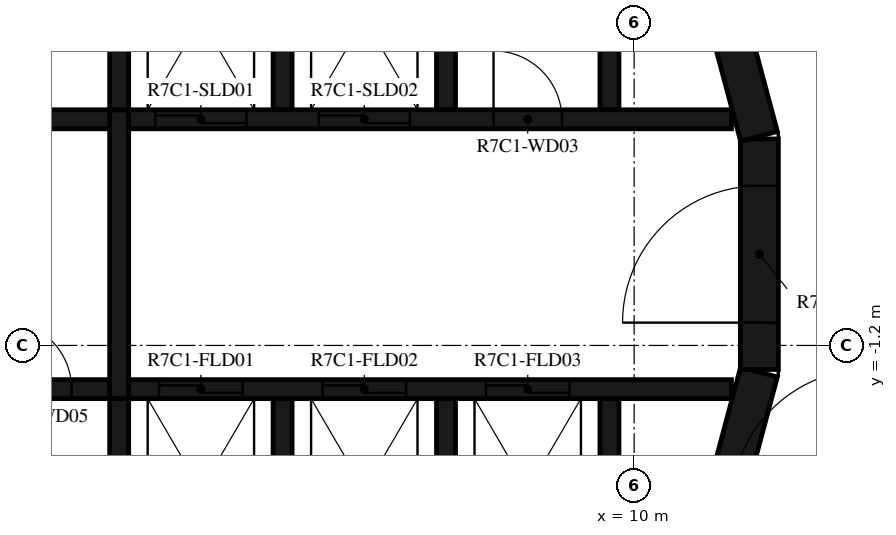
"""IFC4 building model, lengths in metres.
Left out: names, types, materials, properties, quantities, classifications, styles, units other than length and angle.
Written with IfcOpenShell. Run it as: python <this file> out.ifc"""

import sys

from ifc_helpers import new_model, si_unit, direction, frame, frame_2d, origin, place, context, subcontext, project, spatial, polyline, rectangle, outline, extrude, element, fill, save


model = new_model("IFC4")
c1 = context("Model", 3, precision=1e-05, world=origin(), true_north=direction((0.0, 1.0)))
c2 = subcontext(c1, "Body", "Model", "MODEL_VIEW")
j1 = project(units=[si_unit("LENGTHUNIT", "METRE"), si_unit("PLANEANGLEUNIT", "RADIAN")], contexts=[c1])
p1 = place(None, origin())
s1 = spatial("IfcSite", under=j1, at=p1, CompositionType="ELEMENT")
p2 = place(p1, origin())
s2 = spatial("IfcBuilding", under=s1, at=p2, CompositionType="ELEMENT")
p3 = place(p2, frame((0.0, 0.0, 287.9)))
s3 = spatial("IfcBuildingStorey", under=s2, at=p3, CompositionType="ELEMENT", Elevation=287.9)
p4 = place(p3, frame((10.858, -4.479, 0.0), z_axis=(0.0, 0.0, 1.0), x_axis=(0.258734743916, 0.965948410781, 0.0)))
e1 = element("IfcWall", 1, at=p4, inside=s3, PredefinedType="SHEAR", context=c2, shape_type="SweptSolid", body=[
    extrude(rectangle(XDim=3.033, YDim=0.5, at=frame_2d((1.516, 0.0))), origin(), (0.0, 0.0, 1.0), 3.05),
])
p5 = place(p3, frame((11.647, -1.516, 0.0), z_axis=(0.0, 0.0, 1.0), x_axis=(0.0, 1.0, 0.0)))
e2 = element("IfcWall", 2, at=p5, inside=s3, PredefinedType="SHEAR", context=c2, shape_type="SweptSolid", body=[
    extrude(rectangle(XDim=3.033, YDim=0.5, at=frame_2d((1.516, 0.0))), origin(), (0.0, 0.0, 1.0), 3.05),
])
p6 = place(p5, frame((0.616, 0.0, 0.0)))
e3 = element("IfcOpeningElement", 3, at=p6, cuts=e2, PredefinedType="OPENING", context=c2, shape_type="SweptSolid", body=[
    extrude(rectangle(XDim=1.8, YDim=2.1, at=frame_2d((0.9, 1.05))), frame((0.0, 0.26, 0.0), z_axis=(0.0, -1.0, 0.0), x_axis=(1.0, 0.0, 0.0)), (0.0, 0.0, 1.0), 0.52),
])
p7 = place(p3, frame((11.643, 1.55, 0.0), z_axis=(0.0, 0.0, 1.0), x_axis=(-0.258734743916, 0.965948410781, 0.0)))
e4 = element("IfcWall", 4, at=p7, inside=s3, PredefinedType="SHEAR", context=c2, shape_type="SweptSolid", body=[
    extrude(rectangle(XDim=3.033, YDim=0.5, at=frame_2d((1.516, 0.0))), origin(), (0.0, 0.0, 1.0), 3.05),
])
p8 = place(p3, origin())
e5 = element("IfcWall", 5, at=p8, inside=s3, PredefinedType="SHEAR", context=c2, shape_type="SweptSolid", body=[
    extrude(outline(polyline([(-9.8, 1.9), (-9.55, 1.9), (-9.55, 4.8), (-5.5, 4.8), (-5.5, 1.9), (-5.25, 1.9), (-5.25, 4.8), (3.1, 4.8), (3.1, 1.9), (3.35, 1.9), (3.35, 4.8), (5.25, 4.8), (5.25, 1.9), (5.5, 1.9), (5.5, 4.8), (7.4, 4.8), (7.4, 1.9), (7.65, 1.9), (7.65, 4.8), (9.55, 4.8), (9.55, 1.9), (9.8, 1.9), (9.8, 4.8), (9.8, 5.05), (-9.8, 5.05), (-9.8, 4.8), (-9.8, 1.9)])), origin(), (0.0, 0.0, 1.0), 3.05),
])
p9 = place(p3, origin())
e6 = element("IfcWall", 6, at=p9, inside=s3, PredefinedType="SHEAR", context=c2, shape_type="SweptSolid", body=[
    extrude(outline(polyline([(9.8, -5.05), (9.8, -4.8), (9.8, -1.9), (9.55, -1.9), (9.55, -4.8), (7.65, -4.8), (7.65, -1.9), (7.4, -1.9), (7.4, -4.8), (5.5, -4.8), (5.5, -1.9), (5.25, -1.9), (5.25, -4.8), (3.35, -4.8), (3.35, -1.9), (3.1, -1.9), (3.1, -4.8), (1.2, -4.8), (1.2, -1.9), (0.95, -1.9), (0.95, -4.8), (-0.95, -4.8), (-0.95, -1.9), (-1.2, -1.9), (-1.2, -4.8), (-3.1, -4.8), (-3.1, -1.9), (-3.35, -1.9), (-3.35, -4.8), (-5.25, -4.8), (-5.25, -1.9), (-5.5, -1.9), (-5.5, -4.8), (-9.55, -4.8), (-9.55, -1.9), (-9.8, -1.9), (-9.8, -4.8), (-9.8, -5.05), (9.8, -5.05)])), origin(), (0.0, 0.0, 1.0), 3.05),
])
p10 = place(p3, frame((-11.28, 1.775, 0.0), z_axis=(0.0, 0.0, 1.0), x_axis=(1.0, 0.0, 0.0)))
e7 = element("IfcWall", 7, at=p10, inside=s3, PredefinedType="SHEAR", context=c2, shape_type="SweptSolid", body=[
    extrude(rectangle(XDim=14.38, YDim=0.25, at=frame_2d((7.19, 0.0))), origin(), (0.0, 0.0, 1.0), 3.05),
])
p11 = place(p10, frame((3.305, 0.0, 0.0)))
e8 = element("IfcOpeningElement", 8, at=p11, cuts=e7, PredefinedType="OPENING", context=c2, shape_type="SweptSolid", body=[
    extrude(rectangle(XDim=0.9, YDim=2.1, at=frame_2d((0.45, 1.05))), frame((0.0, 0.135, 0.0), z_axis=(0.0, -1.0, 0.0), x_axis=(1.0, 0.0, 0.0)), (0.0, 0.0, 1.0), 0.27),
])
p12 = place(p10, frame((9.755, 0.0, 0.0)))
e9 = element("IfcOpeningElement", 9, at=p12, cuts=e7, PredefinedType="OPENING", context=c2, shape_type="SweptSolid", body=[
    extrude(rectangle(XDim=0.9, YDim=2.1, at=frame_2d((0.45, 1.05))), frame((0.0, 0.135, 0.0), z_axis=(0.0, -1.0, 0.0), x_axis=(1.0, 0.0, 0.0)), (0.0, 0.0, 1.0), 0.27),
])
p13 = place(p3, frame((3.35, 1.775, 0.0), z_axis=(0.0, 0.0, 1.0), x_axis=(1.0, 0.0, 0.0)))
e10 = element("IfcWall", 10, at=p13, inside=s3, PredefinedType="SHEAR", context=c2, shape_type="SweptSolid", body=[
    extrude(rectangle(XDim=7.93, YDim=0.25, at=frame_2d((3.965, 0.0))), origin(), (0.0, 0.0, 1.0), 3.05),
])
p14 = place(p13, frame((0.35, 0.0, 0.0)))
e11 = element("IfcOpeningElement", 11, at=p14, cuts=e10, PredefinedType="OPENING", context=c2, shape_type="SweptSolid", body=[
    extrude(rectangle(XDim=1.2, YDim=2.4, at=frame_2d((0.6, 1.2))), frame((0.0, 0.135, 0.0), z_axis=(0.0, -1.0, 0.0), x_axis=(1.0, 0.0, 0.0)), (0.0, 0.0, 1.0), 0.27),
])
p15 = place(p13, frame((2.5, 0.0, 0.0)))
e12 = element("IfcOpeningElement", 12, at=p15, cuts=e10, PredefinedType="OPENING", context=c2, shape_type="SweptSolid", body=[
    extrude(rectangle(XDim=1.2, YDim=2.4, at=frame_2d((0.6, 1.2))), frame((0.0, 0.135, 0.0), z_axis=(0.0, -1.0, 0.0), x_axis=(1.0, 0.0, 0.0)), (0.0, 0.0, 1.0), 0.27),
])
p16 = place(p13, frame((4.8, 0.0, 0.0)))
e13 = element("IfcOpeningElement", 13, at=p16, cuts=e10, PredefinedType="OPENING", context=c2, shape_type="SweptSolid", body=[
    extrude(rectangle(XDim=0.9, YDim=2.1, at=frame_2d((0.45, 1.05))), frame((0.0, 0.135, 0.0), z_axis=(0.0, -1.0, 0.0), x_axis=(1.0, 0.0, 0.0)), (0.0, 0.0, 1.0), 0.27),
])
p17 = place(p3, frame((-11.28, -1.775, 0.0), z_axis=(0.0, 0.0, 1.0), x_axis=(1.0, 0.0, 0.0)))
e14 = element("IfcWall", 14, at=p17, inside=s3, PredefinedType="SHEAR", context=c2, shape_type="SweptSolid", body=[
    extrude(rectangle(XDim=14.38, YDim=0.25, at=frame_2d((7.19, 0.0))), origin(), (0.0, 0.0, 1.0), 3.05),
])
p18 = place(p17, frame((6.43, 0.0, 0.0)))
e15 = element("IfcOpeningElement", 15, at=p18, cuts=e14, PredefinedType="OPENING", context=c2, shape_type="SweptSolid", body=[
    extrude(rectangle(XDim=1.1, YDim=2.1, at=frame_2d((0.55, 1.05))), frame((0.0, 0.135, 0.0), z_axis=(0.0, -1.0, 0.0), x_axis=(1.0, 0.0, 0.0)), (0.0, 0.0, 1.0), 0.27),
])
p19 = place(p17, frame((8.58, 0.0, 0.0)))
e16 = element("IfcOpeningElement", 16, at=p19, cuts=e14, PredefinedType="OPENING", context=c2, shape_type="SweptSolid", body=[
    extrude(rectangle(XDim=1.1, YDim=2.1, at=frame_2d((0.55, 1.05))), frame((0.0, 0.135, 0.0), z_axis=(0.0, -1.0, 0.0), x_axis=(1.0, 0.0, 0.0)), (0.0, 0.0, 1.0), 0.27),
])
p20 = place(p17, frame((10.73, 0.0, 0.0)))
e17 = element("IfcOpeningElement", 17, at=p20, cuts=e14, PredefinedType="OPENING", context=c2, shape_type="SweptSolid", body=[
    extrude(rectangle(XDim=1.1, YDim=2.1, at=frame_2d((0.55, 1.05))), frame((0.0, 0.135, 0.0), z_axis=(0.0, -1.0, 0.0), x_axis=(1.0, 0.0, 0.0)), (0.0, 0.0, 1.0), 0.27),
])
p21 = place(p17, frame((3.305, 0.0, 0.0)))
e18 = element("IfcOpeningElement", 18, at=p21, cuts=e14, PredefinedType="OPENING", context=c2, shape_type="SweptSolid", body=[
    extrude(rectangle(XDim=0.9, YDim=2.1, at=frame_2d((0.45, 1.05))), frame((0.0, 0.135, 0.0), z_axis=(0.0, -1.0, 0.0), x_axis=(1.0, 0.0, 0.0)), (0.0, 0.0, 1.0), 0.27),
])
p22 = place(p17, frame((12.98, 0.0, 0.0)))
e19 = element("IfcOpeningElement", 19, at=p22, cuts=e14, PredefinedType="OPENING", context=c2, shape_type="SweptSolid", body=[
    extrude(rectangle(XDim=0.9, YDim=2.1, at=frame_2d((0.45, 1.05))), frame((0.0, 0.135, 0.0), z_axis=(0.0, -1.0, 0.0), x_axis=(1.0, 0.0, 0.0)), (0.0, 0.0, 1.0), 0.27),
])
p23 = place(p3, frame((3.35, -1.775, 0.0), z_axis=(0.0, 0.0, 1.0), x_axis=(1.0, 0.0, 0.0)))
e20 = element("IfcWall", 20, at=p23, inside=s3, PredefinedType="SHEAR", context=c2, shape_type="SweptSolid", body=[
    extrude(rectangle(XDim=7.93, YDim=0.25, at=frame_2d((3.965, 0.0))), origin(), (0.0, 0.0, 1.0), 3.05),
])
p24 = place(p23, frame((0.4, 0.0, 0.0)))
e21 = element("IfcOpeningElement", 21, at=p24, cuts=e20, PredefinedType="OPENING", context=c2, shape_type="SweptSolid", body=[
    extrude(rectangle(XDim=1.1, YDim=2.4, at=frame_2d((0.55, 1.2))), frame((0.0, 0.135, 0.0), z_axis=(0.0, -1.0, 0.0), x_axis=(1.0, 0.0, 0.0)), (0.0, 0.0, 1.0), 0.27),
])
p25 = place(p23, frame((2.55, 0.0, 0.0)))
e22 = element("IfcOpeningElement", 22, at=p25, cuts=e20, PredefinedType="OPENING", context=c2, shape_type="SweptSolid", body=[
    extrude(rectangle(XDim=1.1, YDim=2.4, at=frame_2d((0.55, 1.2))), frame((0.0, 0.135, 0.0), z_axis=(0.0, -1.0, 0.0), x_axis=(1.0, 0.0, 0.0)), (0.0, 0.0, 1.0), 0.27),
])
p26 = place(p23, frame((4.7, 0.0, 0.0)))
e23 = element("IfcOpeningElement", 23, at=p26, cuts=e20, PredefinedType="OPENING", context=c2, shape_type="SweptSolid", body=[
    extrude(rectangle(XDim=1.1, YDim=2.4, at=frame_2d((0.55, 1.2))), frame((0.0, 0.135, 0.0), z_axis=(0.0, -1.0, 0.0), x_axis=(1.0, 0.0, 0.0)), (0.0, 0.0, 1.0), 0.27),
])
p27 = place(p3, frame((3.225, -1.9, 0.0), z_axis=(0.0, 0.0, 1.0), x_axis=(0.0, 1.0, 0.0)))
e24 = element("IfcWall", 24, at=p27, inside=s3, PredefinedType="SHEAR", context=c2, shape_type="SweptSolid", body=[
    extrude(rectangle(XDim=3.8, YDim=0.25, at=frame_2d((1.9, 0.0))), origin(), (0.0, 0.0, 1.0), 3.05),
])
p28 = place(p3, frame((11.223, -8.154, 0.0), z_axis=(0.0, 0.0, 1.0), x_axis=(0.358341090983, 0.93359073609, 0.0)))
e25 = element("IfcWall", 25, at=p28, inside=s3, PredefinedType="STANDARD", context=c2, shape_type="SweptSolid", body=[
    extrude(rectangle(XDim=7.181, YDim=0.2, at=frame_2d((3.59, 0.0))), origin(), (0.0, 0.0, 1.0), 3.05),
])
p29 = place(p28, frame((5.185, 0.0, 0.0)))
e26 = element("IfcOpeningElement", 26, at=p29, cuts=e25, PredefinedType="OPENING", context=c2, shape_type="SweptSolid", body=[
    extrude(rectangle(XDim=1.8, YDim=2.1, at=frame_2d((0.9, 1.05))), frame((0.0, 0.11, 0.0), z_axis=(0.0, -1.0, 0.0), x_axis=(1.0, 0.0, 0.0)), (0.0, 0.0, 1.0), 0.22),
])
p30 = place(p6, origin())
e27 = element("IfcDoor", 27, at=p30, inside=s3, OperationType="DOUBLE_DOOR_SINGLE_SWING", PredefinedType="DOOR", context=c2, shape_type="SweptSolid", body=[
    extrude(rectangle(XDim=1.8, YDim=2.1, at=frame_2d((0.9, 1.05))), frame((0.0, 0.025, 0.0), z_axis=(0.0, -1.0, 0.0), x_axis=(1.0, 0.0, 0.0)), (0.0, 0.0, 1.0), 0.05),
])
fill(e3, e27)
p31 = place(p14, origin())
e28 = element("IfcDoor", 28, at=p31, inside=s3, OperationType="DOUBLE_DOOR_SLIDING", PredefinedType="DOOR", context=c2, shape_type="SweptSolid", body=[
    extrude(rectangle(XDim=1.2, YDim=2.4, at=frame_2d((0.6, 1.2))), frame((0.0, 0.025, 0.0), z_axis=(0.0, -1.0, 0.0), x_axis=(1.0, 0.0, 0.0)), (0.0, 0.0, 1.0), 0.05),
])
fill(e11, e28)
p32 = place(p15, origin())
e29 = element("IfcDoor", 29, at=p32, inside=s3, OperationType="DOUBLE_DOOR_SLIDING", PredefinedType="DOOR", context=c2, shape_type="SweptSolid", body=[
    extrude(rectangle(XDim=1.2, YDim=2.4, at=frame_2d((0.6, 1.2))), frame((0.0, 0.025, 0.0), z_axis=(0.0, -1.0, 0.0), x_axis=(1.0, 0.0, 0.0)), (0.0, 0.0, 1.0), 0.05),
])
fill(e12, e29)
p33 = place(p24, origin())
e30 = element("IfcDoor", 30, at=p33, inside=s3, OperationType="DOUBLE_DOOR_SLIDING", PredefinedType="DOOR", context=c2, shape_type="SweptSolid", body=[
    extrude(rectangle(XDim=1.1, YDim=2.4, at=frame_2d((0.55, 1.2))), frame((0.0, 0.025, 0.0), z_axis=(0.0, -1.0, 0.0), x_axis=(1.0, 0.0, 0.0)), (0.0, 0.0, 1.0), 0.05),
])
fill(e21, e30)
p34 = place(p25, origin())
e31 = element("IfcDoor", 31, at=p34, inside=s3, OperationType="DOUBLE_DOOR_SLIDING", PredefinedType="DOOR", context=c2, shape_type="SweptSolid", body=[
    extrude(rectangle(XDim=1.1, YDim=2.4, at=frame_2d((0.55, 1.2))), frame((0.0, 0.025, 0.0), z_axis=(0.0, -1.0, 0.0), x_axis=(1.0, 0.0, 0.0)), (0.0, 0.0, 1.0), 0.05),
])
fill(e22, e31)
p35 = place(p26, origin())
e32 = element("IfcDoor", 32, at=p35, inside=s3, OperationType="DOUBLE_DOOR_SLIDING", PredefinedType="DOOR", context=c2, shape_type="SweptSolid", body=[
    extrude(rectangle(XDim=1.1, YDim=2.4, at=frame_2d((0.55, 1.2))), frame((0.0, 0.025, 0.0), z_axis=(0.0, -1.0, 0.0), x_axis=(1.0, 0.0, 0.0)), (0.0, 0.0, 1.0), 0.05),
])
fill(e23, e32)
p36 = place(p16, origin())
e33 = element("IfcDoor", 33, at=p36, inside=s3, OperationType="SINGLE_SWING_LEFT", PredefinedType="DOOR", context=c2, shape_type="SweptSolid", body=[
    extrude(rectangle(XDim=0.9, YDim=2.1, at=frame_2d((0.45, 1.05))), frame((0.0, 0.025, 0.0), z_axis=(0.0, -1.0, 0.0), x_axis=(1.0, 0.0, 0.0)), (0.0, 0.0, 1.0), 0.05),
])
fill(e13, e33)
p37 = place(p22, origin())
e34 = element("IfcDoor", 34, at=p37, inside=s3, OperationType="SINGLE_SWING_LEFT", PredefinedType="DOOR", context=c2, shape_type="SweptSolid", body=[
    extrude(rectangle(XDim=0.9, YDim=2.1, at=frame_2d((0.45, 1.05))), frame((0.0, 0.025, 0.0), z_axis=(0.0, -1.0, 0.0), x_axis=(1.0, 0.0, 0.0)), (0.0, 0.0, 1.0), 0.05),
])
fill(e19, e34)
save(model, sys.argv[1])
